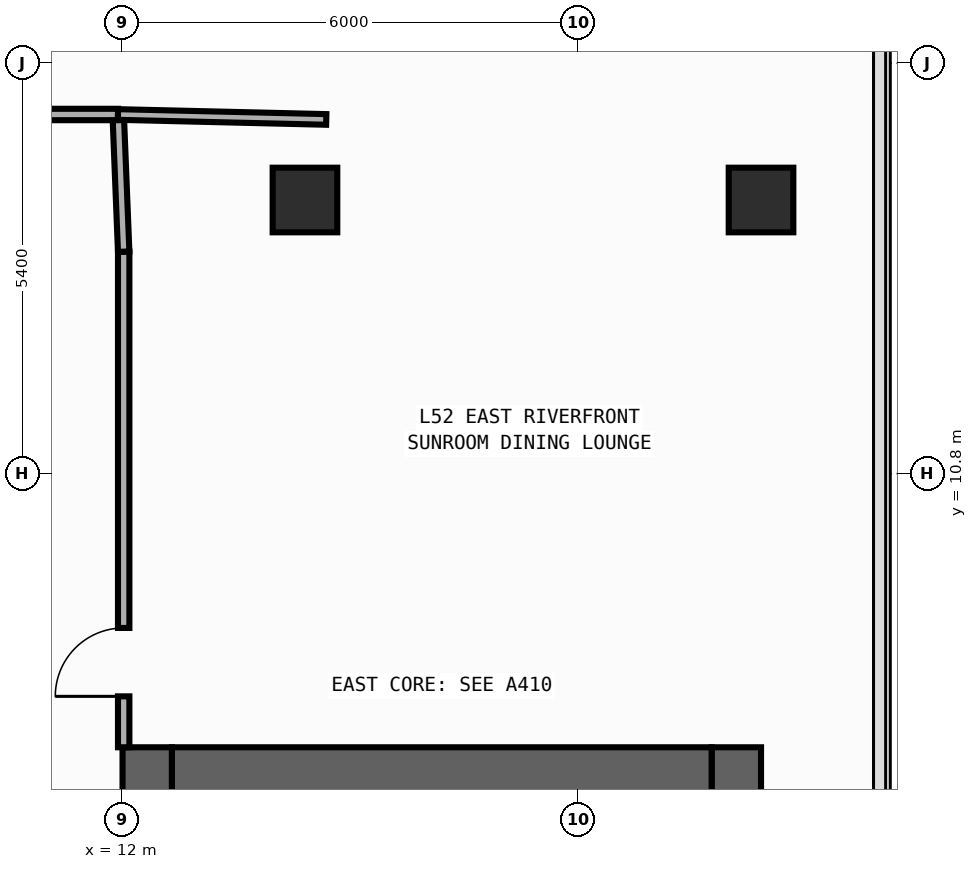
"""IFC4 building model, lengths in metres.
Left out: names, types, materials, properties, quantities, classifications, styles, units other than length and angle.
Written with IfcOpenShell. Run it as: python <this file> out.ifc"""

import sys

from ifc_helpers import new_model, si_unit, direction, frame, frame_2d, origin, origin_2d, place, context, subcontext, project, spatial, rectangle, extrude, element, fill, save


model = new_model("IFC4")
c1 = context("Model", 3, precision=1e-05, world=origin(), true_north=direction((0.0, 1.0)))
c2 = subcontext(c1, "Body", "Model", "MODEL_VIEW")
j1 = project(units=[si_unit("LENGTHUNIT", "METRE"), si_unit("PLANEANGLEUNIT", "RADIAN")], contexts=[c1])
p1 = place(None, origin())
s1 = spatial("IfcSite", under=j1, at=p1, CompositionType="ELEMENT")
p2 = place(p1, origin())
s2 = spatial("IfcBuilding", under=s1, at=p2, CompositionType="ELEMENT")
p3 = place(p2, frame((0.0, 0.0, 226.0)))
s3 = spatial("IfcBuildingStorey", under=s2, at=p3, CompositionType="ELEMENT", Elevation=226.0)
p4 = place(p3, frame((12.325, -19.8, 0.0), z_axis=(0.0, 0.0, 1.0), x_axis=(0.0, 1.0, 0.0)))
e1 = element("IfcWall", 1, at=p4, inside=s3, PredefinedType="SHEAR", context=c2, shape_type="SweptSolid", body=[
    extrude(rectangle(XDim=27.0, YDim=0.65, at=frame_2d((13.5, 0.0))), origin(), (0.0, 0.0, 1.0), 3.34),
])
p5 = place(p4, frame((23.05, 0.0, 0.0)))
e2 = element("IfcOpeningElement", 2, at=p5, cuts=e1, PredefinedType="OPENING", context=c2, shape_type="SweptSolid", body=[
    extrude(rectangle(XDim=1.1, YDim=2.2, at=frame_2d((0.55, 1.1))), frame((0.0, 0.335, 0.0), z_axis=(0.0, -1.0, 0.0), x_axis=(1.0, 0.0, 0.0)), (0.0, 0.0, 1.0), 0.67),
])
p6 = place(p4, frame((19.85, 0.0, 0.0)))
e3 = element("IfcOpeningElement", 3, at=p6, cuts=e1, PredefinedType="OPENING", context=c2, shape_type="SweptSolid", body=[
    extrude(rectangle(XDim=1.1, YDim=2.2, at=frame_2d((0.55, 1.1))), frame((0.0, 0.335, 0.0), z_axis=(0.0, -1.0, 0.0), x_axis=(1.0, 0.0, 0.0)), (0.0, 0.0, 1.0), 0.67),
])
p7 = place(p4, frame((16.65, 0.0, 0.0)))
e4 = element("IfcOpeningElement", 4, at=p7, cuts=e1, PredefinedType="OPENING", context=c2, shape_type="SweptSolid", body=[
    extrude(rectangle(XDim=1.1, YDim=2.2, at=frame_2d((0.55, 1.1))), frame((0.0, 0.335, 0.0), z_axis=(0.0, -1.0, 0.0), x_axis=(1.0, 0.0, 0.0)), (0.0, 0.0, 1.0), 0.67),
])
p8 = place(p4, frame((7.175, 0.0, 0.0)))
e5 = element("IfcOpeningElement", 5, at=p8, cuts=e1, PredefinedType="OPENING", context=c2, shape_type="SweptSolid", body=[
    extrude(rectangle(XDim=0.85, YDim=2.1, at=frame_2d((0.425, 1.05))), frame((0.0, 0.335, 0.0), z_axis=(0.0, -1.0, 0.0), x_axis=(1.0, 0.0, 0.0)), (0.0, 0.0, 1.0), 0.67),
])
p9 = place(p4, frame((10.375, 0.0, 0.0)))
e6 = element("IfcOpeningElement", 6, at=p9, cuts=e1, PredefinedType="OPENING", context=c2, shape_type="SweptSolid", body=[
    extrude(rectangle(XDim=0.85, YDim=2.1, at=frame_2d((0.425, 1.05))), frame((0.0, 0.335, 0.0), z_axis=(0.0, -1.0, 0.0), x_axis=(1.0, 0.0, 0.0)), (0.0, 0.0, 1.0), 0.67),
])
p10 = place(p4, frame((12.725, 0.0, 0.0)))
e7 = element("IfcOpeningElement", 7, at=p10, cuts=e1, PredefinedType="OPENING", context=c2, shape_type="SweptSolid", body=[
    extrude(rectangle(XDim=1.15, YDim=2.2, at=frame_2d((0.575, 1.1))), frame((0.0, 0.335, 0.0), z_axis=(0.0, -1.0, 0.0), x_axis=(1.0, 0.0, 0.0)), (0.0, 0.0, 1.0), 0.67),
])
p11 = place(p4, frame((25.125, 0.0, 0.0)))
e8 = element("IfcOpeningElement", 8, at=p11, cuts=e1, PredefinedType="OPENING", context=c2, shape_type="SweptSolid", body=[
    extrude(rectangle(XDim=0.85, YDim=2.1, at=frame_2d((0.425, 1.05))), frame((0.0, 0.335, 0.0), z_axis=(0.0, -1.0, 0.0), x_axis=(1.0, 0.0, 0.0)), (0.0, 0.0, 1.0), 0.67),
])
p12 = place(p3, frame((20.075, -19.8, 0.0), z_axis=(0.0, 0.0, 1.0), x_axis=(0.0, 1.0, 0.0)))
e9 = element("IfcWall", 9, at=p12, inside=s3, PredefinedType="SHEAR", context=c2, shape_type="SweptSolid", body=[
    extrude(rectangle(XDim=27.0, YDim=0.65, at=frame_2d((13.5, 0.0))), origin(), (0.0, 0.0, 1.0), 3.34),
])
p13 = place(p3, frame((12.65, 6.875, 0.0), z_axis=(0.0, 0.0, 1.0), x_axis=(1.0, 0.0, 0.0)))
e10 = element("IfcWall", 10, at=p13, inside=s3, PredefinedType="SHEAR", context=c2, shape_type="SweptSolid", body=[
    extrude(rectangle(XDim=7.1, YDim=0.65, at=frame_2d((3.55, 0.0))), origin(), (0.0, 0.0, 1.0), 3.34),
])
for number, where, z_axis, x_axis in (
    (11, (20.4, 14.4, 0.0), (0.0, 0.0, 1.0), (1.0, 0.0, 0.0)),
    (12, (14.4, 14.4, 0.0), (0.0, 0.0, 1.0), (1.0, 0.0, 0.0)),
):
    element("IfcColumn", number, at=place(p3, frame(where, z_axis=z_axis, x_axis=x_axis)), inside=s3, PredefinedType="COLUMN", context=c2, shape_type="SweptSolid", body=[
        extrude(rectangle(XDim=0.85, YDim=0.85, at=origin_2d()), origin(), (0.0, 0.0, 1.0), 3.6),
    ])
p14 = place(p3, frame((12.015, 7.2, 0.0), z_axis=(0.0, 0.0, 1.0), x_axis=(0.0, 1.0, 0.0)))
e13 = element("IfcWall", 13, at=p14, inside=s3, PredefinedType="PARTITIONING", context=c2, shape_type="SweptSolid", body=[
    extrude(rectangle(XDim=6.52, YDim=0.15, at=frame_2d((3.26, 0.0))), origin(), (0.0, 0.0, 1.0), 3.34),
])
p15 = place(p14, frame((0.67, 0.0, 0.0)))
e14 = element("IfcOpeningElement", 14, at=p15, cuts=e13, PredefinedType="OPENING", context=c2, shape_type="SweptSolid", body=[
    extrude(rectangle(XDim=0.9, YDim=2.15, at=frame_2d((0.45, 1.075))), frame((0.0, 0.085, 0.0), z_axis=(0.0, -1.0, 0.0), x_axis=(1.0, 0.0, 0.0)), (0.0, 0.0, 1.0), 0.17),
])
p16 = place(p3, frame((10.56, 15.525, 0.0), z_axis=(0.0, 0.0, 1.0), x_axis=(1.0, 0.0, 0.0)))
e15 = element("IfcWall", 15, at=p16, inside=s3, PredefinedType="PARTITIONING", context=c2, shape_type="SweptSolid", body=[
    extrude(rectangle(XDim=1.38, YDim=0.15, at=frame_2d((0.69, 0.0))), origin(), (0.0, 0.0, 1.0), 3.34),
])
p17 = place(p3, frame((12.015, 13.72, 0.0), z_axis=(0.0, 0.0, 1.0), x_axis=(-0.040046877756, 0.99919780203, 0.0)))
e16 = element("IfcWall", 16, at=p17, inside=s3, PredefinedType="PARTITIONING", context=c2, shape_type="SweptSolid", body=[
    extrude(rectangle(XDim=1.731, YDim=0.15, at=frame_2d((0.866, 0.0))), origin(), (0.0, 0.0, 1.0), 3.34),
])
p18 = place(p3, frame((11.94, 15.525, 0.0), z_axis=(0.0, 0.0, 1.0), x_axis=(0.999719241816, -0.023694673289, 0.0)))
e17 = element("IfcWall", 17, at=p18, inside=s3, PredefinedType="PARTITIONING", context=c2, shape_type="SweptSolid", body=[
    extrude(rectangle(XDim=2.741, YDim=0.14, at=frame_2d((1.37, 0.0))), origin(), (0.0, 0.0, 1.0), 3.34),
])
p19 = place(p15, origin())
e18 = element("IfcDoor", 18, at=p19, inside=s3, OperationType="SINGLE_SWING_LEFT", PredefinedType="DOOR", context=c2, shape_type="SweptSolid", body=[
    extrude(rectangle(XDim=0.9, YDim=2.15, at=frame_2d((0.45, 1.075))), frame((0.0, 0.025, 0.0), z_axis=(0.0, -1.0, 0.0), x_axis=(1.0, 0.0, 0.0)), (0.0, 0.0, 1.0), 0.05),
])
fill(e14, e18)
save(model, sys.argv[1])
